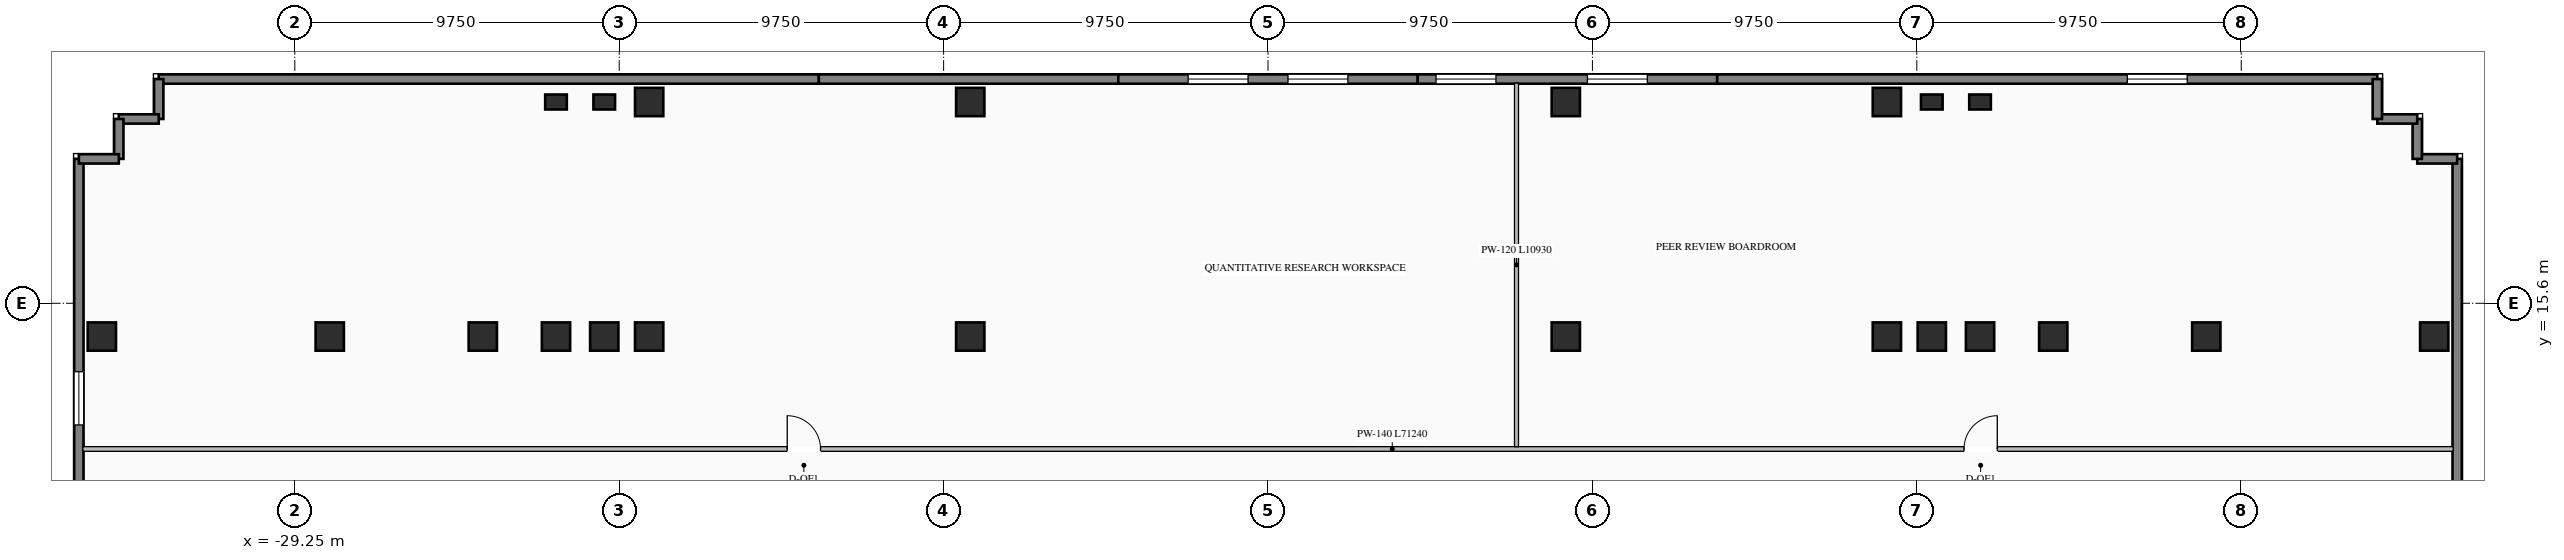
"""IFC4 building model, lengths in metres.
Left out: names, types, materials, properties, quantities, classifications, styles, units other than length and angle.
Written with IfcOpenShell. Run it as: python <this file> out.ifc"""

import sys

from ifc_helpers import new_model, si_unit, direction, frame, frame_2d, origin, origin_2d, place, context, subcontext, project, spatial, rectangle, i_section, extrude, element, fill, save


model = new_model("IFC4")
c1 = context("Model", 3, precision=1e-05, world=origin(), true_north=direction((0.0, 1.0)))
c2 = subcontext(c1, "Body", "Model", "MODEL_VIEW")
j1 = project(units=[si_unit("LENGTHUNIT", "METRE"), si_unit("PLANEANGLEUNIT", "RADIAN")], contexts=[c1])
p1 = place(None, origin())
s1 = spatial("IfcSite", under=j1, at=p1, CompositionType="ELEMENT")
p2 = place(p1, origin())
s2 = spatial("IfcBuilding", under=s1, at=p2, CompositionType="ELEMENT")
p3 = place(p2, frame((0.0, 0.0, 65.7)))
s3 = spatial("IfcBuildingStorey", under=s2, at=p3, CompositionType="ELEMENT", Elevation=65.7)
for number, where, z_axis, x_axis in (
    (1, (-21.4, 14.6, 0.0), (0.0, 0.0, 1.0), (1.0, 0.0, 0.0)),
    (2, (-19.95, 14.6, 0.0), (0.0, 0.0, 1.0), (1.0, 0.0, 0.0)),
    (3, (-18.6, 14.6, 0.0), (0.0, 0.0, 1.0), (1.0, 0.0, 0.0)),
    (4, (-8.95, 14.6, 0.0), (0.0, 0.0, 1.0), (1.0, 0.0, 0.0)),
    (5, (8.95, 14.6, 0.0), (0.0, 0.0, 1.0), (1.0, 0.0, 0.0)),
    (6, (18.6, 14.6, 0.0), (0.0, 0.0, 1.0), (1.0, 0.0, 0.0)),
    (7, (19.95, 14.6, 0.0), (0.0, 0.0, 1.0), (1.0, 0.0, 0.0)),
    (8, (21.4, 14.6, 0.0), (0.0, 0.0, 1.0), (1.0, 0.0, 0.0)),
    (9, (-23.6, 14.6, 0.0), (0.0, 0.0, 1.0), (1.0, 0.0, 0.0)),
    (10, (23.6, 14.6, 0.0), (0.0, 0.0, 1.0), (1.0, 0.0, 0.0)),
    (11, (-28.2, 14.6, 0.0), (0.0, 0.0, 1.0), (1.0, 0.0, 0.0)),
    (12, (28.2, 14.6, 0.0), (0.0, 0.0, 1.0), (1.0, 0.0, 0.0)),
    (13, (-18.6, 21.65, 0.0), (0.0, 0.0, 1.0), (1.0, 0.0, 0.0)),
    (14, (-8.95, 21.65, 0.0), (0.0, 0.0, 1.0), (1.0, 0.0, 0.0)),
    (15, (8.95, 21.65, 0.0), (0.0, 0.0, 1.0), (1.0, 0.0, 0.0)),
    (16, (18.6, 21.65, 0.0), (0.0, 0.0, 1.0), (1.0, 0.0, 0.0)),
    (17, (-35.05, 14.6, 0.0), (0.0, 0.0, 1.0), (1.0, 0.0, 0.0)),
    (18, (35.05, 14.6, 0.0), (0.0, 0.0, 1.0), (1.0, 0.0, 0.0)),
):
    element("IfcColumn", number, at=place(p3, frame(where, z_axis=z_axis, x_axis=x_axis)), inside=s3, PredefinedType="COLUMN", context=c2, shape_type="SweptSolid", body=[
        extrude(i_section(OverallWidth=0.85, OverallDepth=0.85, WebThickness=0.032, FlangeThickness=0.048, at=origin_2d()), origin(), (0.0, 0.0, 1.0), 4.3),
    ])
for number, where, z_axis, x_axis in (
    (19, (-21.4, 21.65, 0.0), (0.0, 0.0, 1.0), (1.0, 0.0, 0.0)),
    (20, (-19.95, 21.65, 0.0), (0.0, 0.0, 1.0), (1.0, 0.0, 0.0)),
    (21, (19.95, 21.65, 0.0), (0.0, 0.0, 1.0), (1.0, 0.0, 0.0)),
    (22, (21.4, 21.65, 0.0), (0.0, 0.0, 1.0), (1.0, 0.0, 0.0)),
):
    element("IfcColumn", number, at=place(p3, frame(where, z_axis=z_axis, x_axis=x_axis)), inside=s3, PredefinedType="PILASTER", context=c2, shape_type="SweptSolid", body=[
        extrude(rectangle(XDim=0.65, YDim=0.45, at=origin_2d()), origin(), (0.0, 0.0, 1.0), 4.3),
    ])
p4 = place(p3, frame((-33.34, 22.34, 0.0), z_axis=(0.0, 0.0, 1.0), x_axis=(1.0, 0.0, 0.0)))
e23 = element("IfcWall", 23, at=p4, inside=s3, PredefinedType="STANDARD", context=c2, shape_type="SweptSolid", body=[
    extrude(rectangle(XDim=19.84, YDim=0.28, at=frame_2d((9.92, 0.0))), origin(), (0.0, 0.0, 1.0), 2.195),
])
p5 = place(p3, frame((-13.5, 22.34, 0.0), z_axis=(0.0, 0.0, 1.0), x_axis=(1.0, 0.0, 0.0)))
e24 = element("IfcWall", 24, at=p5, inside=s3, PredefinedType="STANDARD", context=c2, shape_type="SweptSolid", body=[
    extrude(rectangle(XDim=9.0, YDim=0.28, at=frame_2d((4.5, 0.0))), origin(), (0.0, 0.0, 1.0), 2.195),
])
p6 = place(p3, frame((-4.5, 22.34, 0.0), z_axis=(0.0, 0.0, 1.0), x_axis=(1.0, 0.0, 0.0)))
e25 = element("IfcWall", 25, at=p6, inside=s3, PredefinedType="STANDARD", context=c2, shape_type="SweptSolid", body=[
    extrude(rectangle(XDim=9.0, YDim=0.28, at=frame_2d((4.5, 0.0))), origin(), (0.0, 0.0, 1.0), 4.0),
])
p7 = place(p6, frame((2.1, 0.0, 0.76)))
e26 = element("IfcOpeningElement", 26, at=p7, cuts=e25, PredefinedType="OPENING", context=c2, shape_type="SweptSolid", body=[
    extrude(rectangle(XDim=1.8, YDim=1.95, at=frame_2d((0.9, 0.975))), frame((0.0, 0.15, 0.0), z_axis=(0.0, -1.0, 0.0), x_axis=(1.0, 0.0, 0.0)), (0.0, 0.0, 1.0), 0.3),
])
p8 = place(p6, frame((5.1, 0.0, 0.76)))
e27 = element("IfcOpeningElement", 27, at=p8, cuts=e25, PredefinedType="OPENING", context=c2, shape_type="SweptSolid", body=[
    extrude(rectangle(XDim=1.8, YDim=1.95, at=frame_2d((0.9, 0.975))), frame((0.0, 0.15, 0.0), z_axis=(0.0, -1.0, 0.0), x_axis=(1.0, 0.0, 0.0)), (0.0, 0.0, 1.0), 0.3),
])
p9 = place(p3, frame((4.5, 22.34, 0.0), z_axis=(0.0, 0.0, 1.0), x_axis=(1.0, 0.0, 0.0)))
e28 = element("IfcWall", 28, at=p9, inside=s3, PredefinedType="STANDARD", context=c2, shape_type="SweptSolid", body=[
    extrude(rectangle(XDim=9.0, YDim=0.28, at=frame_2d((4.5, 0.0))), origin(), (0.0, 0.0, 1.0), 4.0),
])
p10 = place(p9, frame((0.55, 0.0, 0.76)))
e29 = element("IfcOpeningElement", 29, at=p10, cuts=e28, PredefinedType="OPENING", context=c2, shape_type="SweptSolid", body=[
    extrude(rectangle(XDim=1.8, YDim=1.95, at=frame_2d((0.9, 0.975))), frame((0.0, 0.15, 0.0), z_axis=(0.0, -1.0, 0.0), x_axis=(1.0, 0.0, 0.0)), (0.0, 0.0, 1.0), 0.3),
])
p11 = place(p9, frame((5.1, 0.0, 0.76)))
e30 = element("IfcOpeningElement", 30, at=p11, cuts=e28, PredefinedType="OPENING", context=c2, shape_type="SweptSolid", body=[
    extrude(rectangle(XDim=1.8, YDim=1.95, at=frame_2d((0.9, 0.975))), frame((0.0, 0.15, 0.0), z_axis=(0.0, -1.0, 0.0), x_axis=(1.0, 0.0, 0.0)), (0.0, 0.0, 1.0), 0.3),
])
p12 = place(p3, frame((13.5, 22.34, 0.0), z_axis=(0.0, 0.0, 1.0), x_axis=(1.0, 0.0, 0.0)))
e31 = element("IfcWall", 31, at=p12, inside=s3, PredefinedType="STANDARD", context=c2, shape_type="SweptSolid", body=[
    extrude(rectangle(XDim=19.84, YDim=0.28, at=frame_2d((9.92, 0.0))), origin(), (0.0, 0.0, 1.0), 4.0),
])
p13 = place(p12, frame((12.327, 0.0, 0.76)))
e32 = element("IfcOpeningElement", 32, at=p13, cuts=e31, PredefinedType="OPENING", context=c2, shape_type="SweptSolid", body=[
    extrude(rectangle(XDim=1.8, YDim=1.95, at=frame_2d((0.9, 0.975))), frame((0.0, 0.15, 0.0), z_axis=(0.0, -1.0, 0.0), x_axis=(1.0, 0.0, 0.0)), (0.0, 0.0, 1.0), 0.3),
])
p14 = place(p3, frame((-35.74, 0.0, 0.0), z_axis=(0.0, 0.0, 1.0), x_axis=(0.0, 1.0, 0.0)))
e33 = element("IfcWall", 33, at=p14, inside=s3, PredefinedType="STANDARD", context=c2, shape_type="SweptSolid", body=[
    extrude(rectangle(XDim=19.94, YDim=0.28, at=frame_2d((9.97, 0.0))), origin(), (0.0, 0.0, 1.0), 4.0),
])
p15 = place(p14, frame((5.847, 0.0, 0.76)))
e34 = element("IfcOpeningElement", 34, at=p15, cuts=e33, PredefinedType="OPENING", context=c2, shape_type="SweptSolid", body=[
    extrude(rectangle(XDim=1.6, YDim=1.95, at=frame_2d((0.8, 0.975))), frame((0.0, 0.15, 0.0), z_axis=(0.0, -1.0, 0.0), x_axis=(1.0, 0.0, 0.0)), (0.0, 0.0, 1.0), 0.3),
])
p16 = place(p14, frame((11.943, 0.0, 0.76)))
e35 = element("IfcOpeningElement", 35, at=p16, cuts=e33, PredefinedType="OPENING", context=c2, shape_type="SweptSolid", body=[
    extrude(rectangle(XDim=1.6, YDim=1.95, at=frame_2d((0.8, 0.975))), frame((0.0, 0.15, 0.0), z_axis=(0.0, -1.0, 0.0), x_axis=(1.0, 0.0, 0.0)), (0.0, 0.0, 1.0), 0.3),
])
p17 = place(p3, frame((35.74, 19.94, 0.0), z_axis=(0.0, 0.0, 1.0), x_axis=(0.0, -1.0, 0.0)))
e36 = element("IfcWall", 36, at=p17, inside=s3, PredefinedType="STANDARD", context=c2, shape_type="SweptSolid", body=[
    extrude(rectangle(XDim=19.94, YDim=0.28, at=frame_2d((9.97, 0.0))), origin(), (0.0, 0.0, 1.0), 2.195),
])
for number, where, z_axis, x_axis in (
    (37, (35.74, 19.94, 0.0), (0.0, 0.0, 1.0), (-1.0, 0.0, 0.0)),
    (38, (34.54, 19.94, 0.0), (0.0, 0.0, 1.0), (0.0, 1.0, 0.0)),
    (39, (34.54, 21.14, 0.0), (0.0, 0.0, 1.0), (-1.0, 0.0, 0.0)),
):
    element("IfcWall", number, at=place(p3, frame(where, z_axis=z_axis, x_axis=x_axis)), inside=s3, PredefinedType="STANDARD", context=c2, shape_type="SweptSolid", body=[
        extrude(rectangle(XDim=1.2, YDim=0.28, at=frame_2d((0.6, 0.0))), origin(), (0.0, 0.0, 1.0), 4.0),
    ])
for number, where, z_axis, x_axis in (
    (40, (33.34, 21.14, 0.0), (0.0, 0.0, 1.0), (0.0, 1.0, 0.0)),
    (41, (-33.34, 22.34, 0.0), (0.0, 0.0, 1.0), (0.0, -1.0, 0.0)),
):
    element("IfcWall", number, at=place(p3, frame(where, z_axis=z_axis, x_axis=x_axis)), inside=s3, PredefinedType="STANDARD", context=c2, shape_type="SweptSolid", body=[
        extrude(rectangle(XDim=1.2, YDim=0.28, at=frame_2d((0.6, 0.0))), origin(), (0.0, 0.0, 1.0), 4.0),
    ])
for number, where, z_axis, x_axis in (
    (42, (-33.34, 21.14, 0.0), (0.0, 0.0, 1.0), (-1.0, 0.0, 0.0)),
    (43, (-34.54, 21.14, 0.0), (0.0, 0.0, 1.0), (0.0, -1.0, 0.0)),
    (44, (-34.54, 19.94, 0.0), (0.0, 0.0, 1.0), (-1.0, 0.0, 0.0)),
):
    element("IfcWall", number, at=place(p3, frame(where, z_axis=z_axis, x_axis=x_axis)), inside=s3, PredefinedType="STANDARD", context=c2, shape_type="SweptSolid", body=[
        extrude(rectangle(XDim=1.2, YDim=0.28, at=frame_2d((0.6, 0.0))), origin(), (0.0, 0.0, 1.0), 4.0),
    ])
p18 = place(p3, frame((-35.62, 11.22, 0.0), z_axis=(0.0, 0.0, 1.0), x_axis=(1.0, 0.0, 0.0)))
e45 = element("IfcWall", 45, at=p18, inside=s3, PredefinedType="STANDARD", context=c2, shape_type="SweptSolid", body=[
    extrude(rectangle(XDim=71.24, YDim=0.14, at=frame_2d((35.62, 0.0))), origin(), (0.0, 0.0, 1.0), 4.0),
])
p19 = place(p18, frame((21.17, 0.0, 0.0)))
e46 = element("IfcOpeningElement", 46, at=p19, cuts=e45, PredefinedType="OPENING", context=c2, shape_type="SweptSolid", body=[
    extrude(rectangle(XDim=1.0, YDim=2.08, at=frame_2d((0.5, 1.04))), frame((0.0, 0.08, 0.0), z_axis=(0.0, -1.0, 0.0), x_axis=(1.0, 0.0, 0.0)), (0.0, 0.0, 1.0), 0.16),
])
p20 = place(p18, frame((56.538, 0.0, 0.0)))
e47 = element("IfcOpeningElement", 47, at=p20, cuts=e45, PredefinedType="OPENING", context=c2, shape_type="SweptSolid", body=[
    extrude(rectangle(XDim=1.0, YDim=2.08, at=frame_2d((0.5, 1.04))), frame((0.0, 0.08, 0.0), z_axis=(0.0, -1.0, 0.0), x_axis=(1.0, 0.0, 0.0)), (0.0, 0.0, 1.0), 0.16),
])
p21 = place(p3, frame((7.468, 11.29, 0.0), z_axis=(0.0, 0.0, 1.0), x_axis=(0.0, 1.0, 0.0)))
e48 = element("IfcWall", 48, at=p21, inside=s3, PredefinedType="STANDARD", context=c2, shape_type="SweptSolid", body=[
    extrude(rectangle(XDim=10.93, YDim=0.12, at=frame_2d((5.465, 0.0))), origin(), (0.0, 0.0, 1.0), 4.0),
])
p22 = place(p7, origin())
e49 = element("IfcWindow", 49, at=p22, inside=s3, PartitioningType="SINGLE_PANEL", PredefinedType="WINDOW", context=c2, shape_type="SweptSolid", body=[
    extrude(rectangle(XDim=1.8, YDim=1.95, at=frame_2d((0.9, 0.975))), frame((0.0, 0.03, 0.0), z_axis=(0.0, -1.0, 0.0), x_axis=(1.0, 0.0, 0.0)), (0.0, 0.0, 1.0), 0.06),
])
fill(e26, e49)
p23 = place(p8, origin())
e50 = element("IfcWindow", 50, at=p23, inside=s3, PartitioningType="SINGLE_PANEL", PredefinedType="WINDOW", context=c2, shape_type="SweptSolid", body=[
    extrude(rectangle(XDim=1.8, YDim=1.95, at=frame_2d((0.9, 0.975))), frame((0.0, 0.03, 0.0), z_axis=(0.0, -1.0, 0.0), x_axis=(1.0, 0.0, 0.0)), (0.0, 0.0, 1.0), 0.06),
])
fill(e27, e50)
p24 = place(p10, origin())
e51 = element("IfcWindow", 51, at=p24, inside=s3, PartitioningType="SINGLE_PANEL", PredefinedType="WINDOW", context=c2, shape_type="SweptSolid", body=[
    extrude(rectangle(XDim=1.8, YDim=1.95, at=frame_2d((0.9, 0.975))), frame((0.0, 0.03, 0.0), z_axis=(0.0, -1.0, 0.0), x_axis=(1.0, 0.0, 0.0)), (0.0, 0.0, 1.0), 0.06),
])
fill(e29, e51)
p25 = place(p11, origin())
e52 = element("IfcWindow", 52, at=p25, inside=s3, PartitioningType="SINGLE_PANEL", PredefinedType="WINDOW", context=c2, shape_type="SweptSolid", body=[
    extrude(rectangle(XDim=1.8, YDim=1.95, at=frame_2d((0.9, 0.975))), frame((0.0, 0.03, 0.0), z_axis=(0.0, -1.0, 0.0), x_axis=(1.0, 0.0, 0.0)), (0.0, 0.0, 1.0), 0.06),
])
fill(e30, e52)
p26 = place(p13, origin())
e53 = element("IfcWindow", 53, at=p26, inside=s3, PartitioningType="SINGLE_PANEL", PredefinedType="WINDOW", context=c2, shape_type="SweptSolid", body=[
    extrude(rectangle(XDim=1.8, YDim=1.95, at=frame_2d((0.9, 0.975))), frame((0.0, 0.03, 0.0), z_axis=(0.0, -1.0, 0.0), x_axis=(1.0, 0.0, 0.0)), (0.0, 0.0, 1.0), 0.06),
])
fill(e32, e53)
p27 = place(p16, origin())
e54 = element("IfcWindow", 54, at=p27, inside=s3, PartitioningType="SINGLE_PANEL", PredefinedType="WINDOW", context=c2, shape_type="SweptSolid", body=[
    extrude(rectangle(XDim=1.6, YDim=1.95, at=frame_2d((0.8, 0.975))), frame((0.0, 0.03, 0.0), z_axis=(0.0, -1.0, 0.0), x_axis=(1.0, 0.0, 0.0)), (0.0, 0.0, 1.0), 0.06),
])
fill(e35, e54)
p28 = place(p19, origin())
e55 = element("IfcDoor", 55, at=p28, inside=s3, OperationType="SINGLE_SWING_LEFT", PredefinedType="DOOR", context=c2, shape_type="SweptSolid", body=[
    extrude(rectangle(XDim=1.0, YDim=2.08, at=frame_2d((0.5, 1.04))), frame((0.0, 0.025, 0.0), z_axis=(0.0, -1.0, 0.0), x_axis=(1.0, 0.0, 0.0)), (0.0, 0.0, 1.0), 0.05),
])
fill(e46, e55)
p29 = place(p20, origin())
e56 = element("IfcDoor", 56, at=p29, inside=s3, OperationType="SINGLE_SWING_RIGHT", PredefinedType="DOOR", context=c2, shape_type="SweptSolid", body=[
    extrude(rectangle(XDim=1.0, YDim=2.08, at=frame_2d((0.5, 1.04))), frame((0.0, 0.025, 0.0), z_axis=(0.0, -1.0, 0.0), x_axis=(1.0, 0.0, 0.0)), (0.0, 0.0, 1.0), 0.05),
])
fill(e47, e56)
save(model, sys.argv[1])
